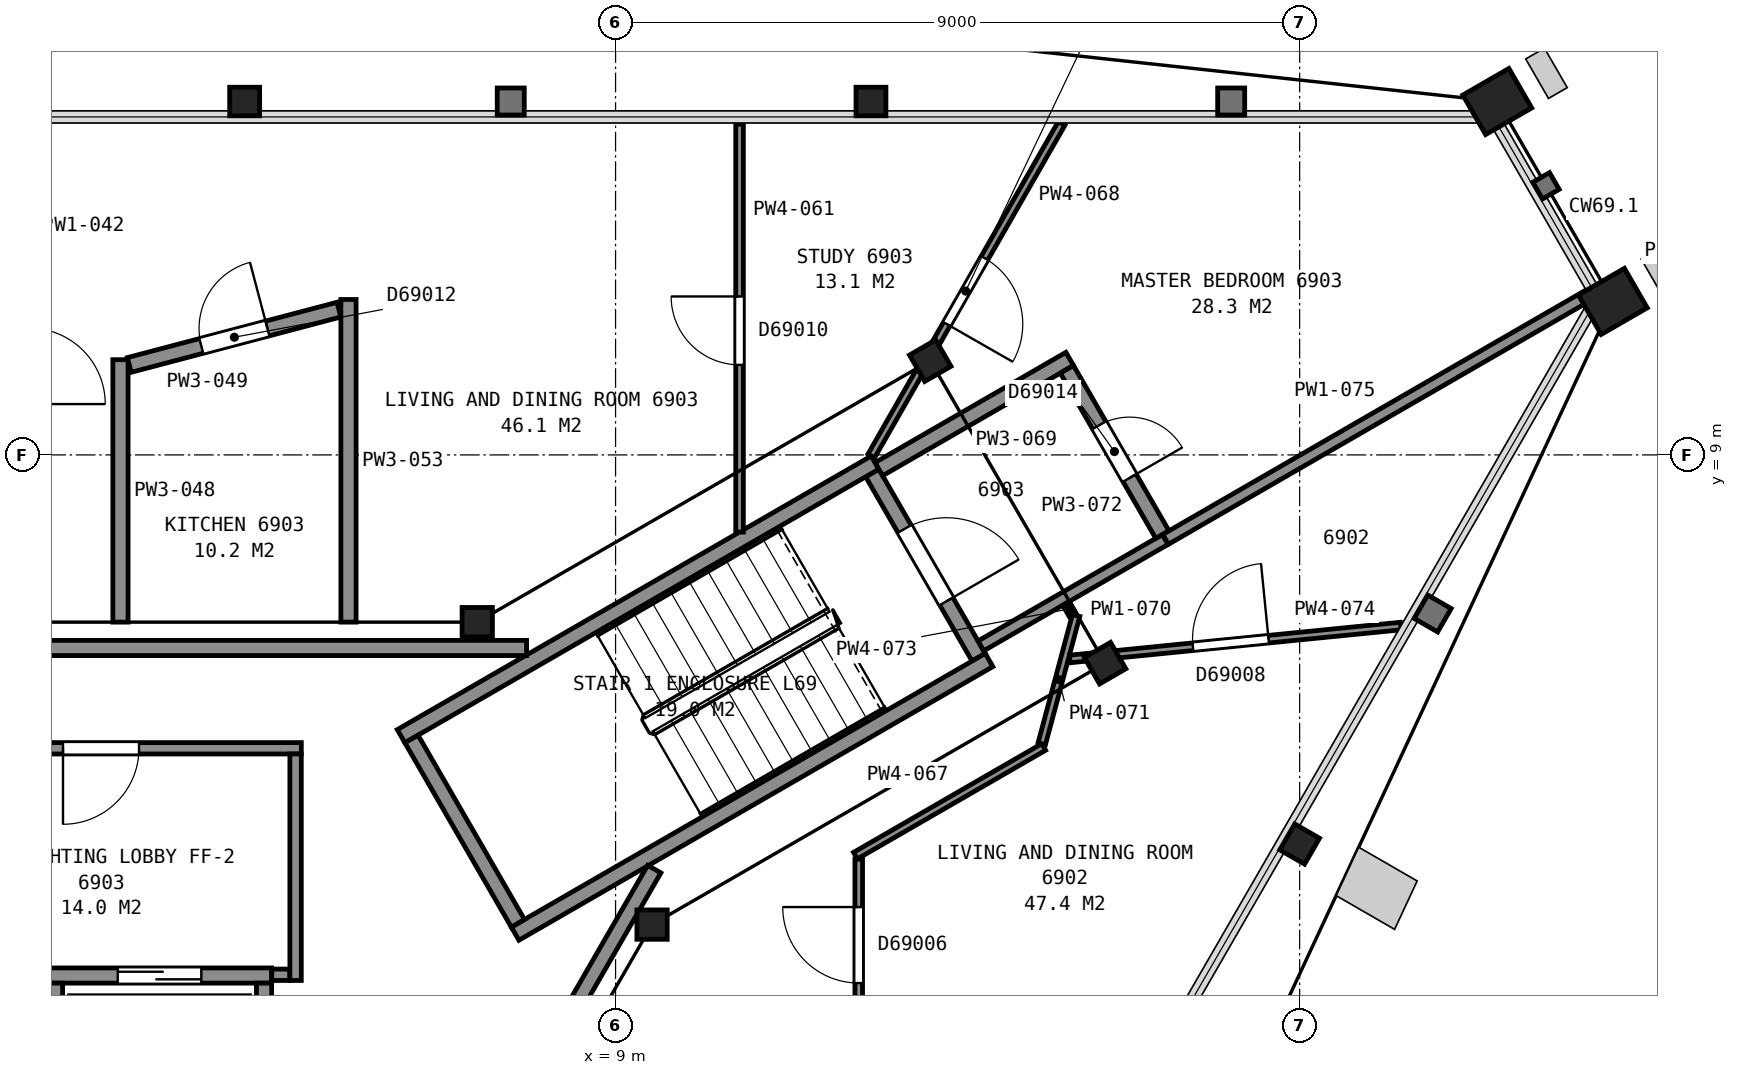
"""IFC4 building model, lengths in metres.
Left out: names, types, materials, properties, quantities, classifications, styles, units other than length and angle.
Written with IfcOpenShell. Run it as: python <this file> out.ifc"""

import sys

from ifc_helpers import new_model, si_unit, direction, frame, frame_2d, origin, origin_2d, place, context, subcontext, project, spatial, rectangle, hollow_rectangle, i_section, extrude, element, fill, save


model = new_model("IFC4")
c1 = context("Model", 3, precision=1e-05, world=origin(), true_north=direction((0.0, 1.0)))
c2 = subcontext(c1, "Body", "Model", "MODEL_VIEW")
j1 = project(units=[si_unit("LENGTHUNIT", "METRE"), si_unit("PLANEANGLEUNIT", "RADIAN")], contexts=[c1])
p1 = place(None, origin())
s1 = spatial("IfcSite", under=j1, at=p1, CompositionType="ELEMENT")
p2 = place(p1, origin())
s2 = spatial("IfcBuilding", under=s1, at=p2, CompositionType="ELEMENT")
p3 = place(p2, frame((0.0, 0.0, 275.1)))
s3 = spatial("IfcBuildingStorey", under=s2, at=p3, CompositionType="ELEMENT", Elevation=275.1)
p4 = place(p3, frame((20.6, 13.65, 0.0), z_axis=(0.0, 0.0, 1.0), x_axis=(0.5, -0.866025403784, 0.0)))
e1 = element("IfcColumn", 1, at=p4, inside=s3, PredefinedType="COLUMN", context=c2, shape_type="SweptSolid", body=[
    extrude(hollow_rectangle(XDim=0.6, YDim=0.7, WallThickness=0.04, at=origin_2d()), origin(), (0.0, 0.0, 1.0), 3.7),
])
for number, where, z_axis, x_axis in (
    (2, (12.36, 13.65, 0.0), (0.0, 0.0, 1.0), (1.0, 0.0, 0.0)),
    (3, (4.12, 13.65, 0.0), (0.0, 0.0, 1.0), (1.0, 0.0, 0.0)),
    (4, (18.0, 3.88, 0.0), (0.0, 0.0, 1.0), (-0.5, -0.866, 0.0)),
):
    element("IfcColumn", number, at=place(p3, frame(where, z_axis=z_axis, x_axis=x_axis)), inside=s3, PredefinedType="COLUMN", context=c2, shape_type="SweptSolid", body=[
        extrude(i_section(OverallWidth=0.394, OverallDepth=0.376, WebThickness=0.017, FlangeThickness=0.028, FilletRadius=0.015, at=origin_2d()), origin(), (0.0, 0.0, 1.0), 3.7),
    ])
p5 = place(p3, frame((22.12, 11.02, 0.0), z_axis=(0.0, 0.0, 1.0), x_axis=(0.5, -0.866025403784, 0.0)))
e5 = element("IfcColumn", 5, at=p5, inside=s3, PredefinedType="COLUMN", context=c2, shape_type="SweptSolid", body=[
    extrude(hollow_rectangle(XDim=0.6, YDim=0.7, WallThickness=0.04, at=origin_2d()), origin(), (0.0, 0.0, 1.0), 3.7),
])
p6 = place(p3, frame((9.48, 2.82, 0.0), z_axis=(0.0, 0.0, 1.0), x_axis=(1.0, 0.0, 0.0)))
e6 = element("IfcColumn", 6, at=p6, inside=s3, PredefinedType="COLUMN", context=c2, shape_type="SweptSolid", body=[
    extrude(i_section(OverallWidth=0.399, OverallDepth=0.386, WebThickness=0.021, FlangeThickness=0.033, FilletRadius=0.015, at=origin_2d()), origin(), (0.0, 0.0, 1.0), 3.7),
])
for number, where, z_axis, x_axis in (
    (7, (15.44, 6.26, 0.0), (0.0, 0.0, 1.0), (0.5, -0.866, 0.0)),
    (8, (13.14, 10.24, 0.0), (0.0, 0.0, 1.0), (0.5, -0.866, 0.0)),
):
    element("IfcColumn", number, at=place(p3, frame(where, z_axis=z_axis, x_axis=x_axis)), inside=s3, PredefinedType="COLUMN", context=c2, shape_type="SweptSolid", body=[
        extrude(i_section(OverallWidth=0.401, OverallDepth=0.399, WebThickness=0.025, FlangeThickness=0.04, FilletRadius=0.015, at=origin_2d()), origin(), (0.0, 0.0, 1.0), 3.7),
    ])
p7 = place(p3, frame((7.18, 6.8, 0.0), z_axis=(0.0, 0.0, 1.0), x_axis=(1.0, 0.0, 0.0)))
e9 = element("IfcColumn", 9, at=p7, inside=s3, PredefinedType="COLUMN", context=c2, shape_type="SweptSolid", body=[
    extrude(i_section(OverallWidth=0.399, OverallDepth=0.386, WebThickness=0.021, FlangeThickness=0.033, FilletRadius=0.015, at=origin_2d()), origin(), (0.0, 0.0, 1.0), 3.7),
])
p8 = place(p3, frame((13.777, 6.338, 0.0), z_axis=(0.0, 0.0, 1.0), x_axis=(-0.500049511043, 0.865996816683, 0.0)))
e10 = element("IfcWall", 10, at=p8, inside=s3, PredefinedType="PARTITIONING", context=c2, shape_type="SweptSolid", body=[
    extrude(rectangle(XDim=2.8, YDim=0.2, at=frame_2d((1.4, 0.0))), origin(), (0.0, 0.0, 1.0), 3.45),
])
p9 = place(p8, frame((0.85, 0.0, 0.0)))
e11 = element("IfcOpeningElement", 11, at=p9, cuts=e10, PredefinedType="OPENING", context=c2, shape_type="SweptSolid", body=[
    extrude(rectangle(XDim=1.1, YDim=2.1, at=frame_2d((0.55, 1.05))), frame((0.0, 0.11, 0.0), z_axis=(0.0, -1.0, 0.0), x_axis=(1.0, 0.0, 0.0)), (0.0, 0.0, 1.0), 0.22),
])
for number, where, z_axis, x_axis in (
    (12, (6.178, 5.299, 0.0), (0.0, 0.0, 1.0), (0.866, 0.5, 0.0)),
    (13, (7.678, 2.701, 0.0), (0.0, 0.0, 1.0), (0.866, 0.5, 0.0)),
):
    element("IfcWall", number, at=place(p3, frame(where, z_axis=z_axis, x_axis=x_axis)), inside=s3, PredefinedType="PARTITIONING", context=c2, shape_type="SweptSolid", body=[
        extrude(rectangle(XDim=7.2, YDim=0.2, at=frame_2d((3.6, 0.0))), origin(), (0.0, 0.0, 1.0), 3.45),
    ])
p10 = place(p3, frame((7.715, 2.838, 0.0), z_axis=(0.0, 0.0, 1.0), x_axis=(-0.500049511043, 0.865996816683, 0.0)))
e14 = element("IfcWall", 14, at=p10, inside=s3, PredefinedType="PARTITIONING", context=c2, shape_type="SweptSolid", body=[
    extrude(rectangle(XDim=2.8, YDim=0.2, at=frame_2d((1.4, 0.0))), origin(), (0.0, 0.0, 1.0), 3.45),
])
p11 = place(p3, frame((1.525, 2.15, 0.0), z_axis=(0.0, 0.0, 1.0), x_axis=(1.0, 0.0, 0.0)))
e15 = element("IfcWall", 15, at=p11, inside=s3, PredefinedType="PARTITIONING", context=c2, shape_type="SweptSolid", body=[
    extrude(rectangle(XDim=2.95, YDim=0.2, at=frame_2d((1.475, 0.0))), origin(), (0.0, 0.0, 1.0), 3.7),
])
p12 = place(p11, frame((0.925, 0.0, 0.0)))
e16 = element("IfcOpeningElement", 16, at=p12, cuts=e15, PredefinedType="OPENING", context=c2, shape_type="SweptSolid", body=[
    extrude(rectangle(XDim=1.1, YDim=2.1, at=frame_2d((0.55, 1.05))), frame((0.0, 0.11, 0.0), z_axis=(0.0, -1.0, 0.0), x_axis=(1.0, 0.0, 0.0)), (0.0, 0.0, 1.0), 0.22),
])
for number, where, z_axis, x_axis in (
    (17, (4.375, 0.1, 0.0), (0.0, 0.0, 1.0), (0.0, 1.0, 0.0)),
    (18, (1.625, 0.1, 0.0), (0.0, 0.0, 1.0), (0.0, 1.0, 0.0)),
):
    element("IfcWall", number, at=place(p3, frame(where, z_axis=z_axis, x_axis=x_axis)), inside=s3, PredefinedType="PARTITIONING", context=c2, shape_type="SweptSolid", body=[
        extrude(rectangle(XDim=1.95, YDim=0.2, at=frame_2d((0.975, 0.0))), origin(), (0.0, 0.0, 1.0), 3.7),
    ])
p13 = place(p3, frame((7.829, 6.46, 0.0), z_axis=(0.0, 0.0, 1.0), x_axis=(-1.0, 0.0, 0.0)))
e19 = element("IfcWall", 19, at=p13, inside=s3, PredefinedType="PARTITIONING", context=c2, shape_type="SweptSolid", body=[
    extrude(rectangle(XDim=15.658, YDim=0.2, at=frame_2d((7.829, 0.0))), origin(), (0.0, 0.0, 1.0), 3.45),
])
p14 = place(p13, frame((12.168, 0.0, 0.0)))
e20 = element("IfcOpeningElement", 20, at=p14, cuts=e19, PredefinedType="OPENING", context=c2, shape_type="SweptSolid", body=[
    extrude(rectangle(XDim=1.2, YDim=2.1, at=frame_2d((0.6, 1.05))), frame((0.0, 0.11, 0.0), z_axis=(0.0, -1.0, 0.0), x_axis=(1.0, 0.0, 0.0)), (0.0, 0.0, 1.0), 0.22),
])
p15 = place(p3, frame((-0.245, 5.14, 0.0), z_axis=(0.0, 0.0, 1.0), x_axis=(1.0, 0.0, 0.0)))
e21 = element("IfcWall", 21, at=p15, inside=s3, PredefinedType="PARTITIONING", context=c2, shape_type="SweptSolid", body=[
    extrude(rectangle(XDim=5.11, YDim=0.15, at=frame_2d((2.555, 0.0))), origin(), (0.0, 0.0, 1.0), 3.45),
])
p16 = place(p15, frame((1.975, 0.0, 0.0)))
e22 = element("IfcOpeningElement", 22, at=p16, cuts=e21, PredefinedType="OPENING", context=c2, shape_type="SweptSolid", body=[
    extrude(rectangle(XDim=1.0, YDim=2.1, at=frame_2d((0.5, 1.05))), frame((0.0, 0.085, 0.0), z_axis=(0.0, -1.0, 0.0), x_axis=(1.0, 0.0, 0.0)), (0.0, 0.0, 1.0), 0.17),
])
p17 = place(p3, frame((3.828, -6.29, 0.0), z_axis=(0.0, 0.0, 1.0), x_axis=(0.499979739078, 0.866037101117, 0.0)))
e23 = element("IfcWall", 23, at=p17, inside=s3, PredefinedType="PARTITIONING", context=c2, shape_type="SweptSolid", body=[
    extrude(rectangle(XDim=11.363, YDim=0.2, at=frame_2d((5.681, 0.0))), origin(), (0.0, 0.0, 1.0), 3.45),
])
p18 = place(p17, frame((0.55, 0.0, 0.0)))
e24 = element("IfcOpeningElement", 24, at=p18, cuts=e23, PredefinedType="OPENING", context=c2, shape_type="SweptSolid", body=[
    extrude(rectangle(XDim=1.2, YDim=2.1, at=frame_2d((0.6, 1.05))), frame((0.0, 0.11, 0.0), z_axis=(0.0, -1.0, 0.0), x_axis=(1.0, 0.0, 0.0)), (0.0, 0.0, 1.0), 0.22),
])
p19 = place(p3, frame((4.477, 2.16, 0.0), z_axis=(0.0, 0.0, 1.0), x_axis=(1.0, 0.0, 0.0)))
e25 = element("IfcWall", 25, at=p19, inside=s3, PredefinedType="PARTITIONING", context=c2, shape_type="SweptSolid", body=[
    extrude(rectangle(XDim=0.238, YDim=0.15, at=frame_2d((0.119, 0.0))), origin(), (0.0, 0.0, 1.0), 3.45),
])
p20 = place(p3, frame((4.79, 2.085, 0.0), z_axis=(0.0, 0.0, 1.0), x_axis=(0.0, 1.0, 0.0)))
e26 = element("IfcWall", 26, at=p20, inside=s3, PredefinedType="PARTITIONING", context=c2, shape_type="SweptSolid", body=[
    extrude(rectangle(XDim=2.98, YDim=0.15, at=frame_2d((1.49, 0.0))), origin(), (0.0, 0.0, 1.0), 3.45),
])
p21 = place(p3, frame((2.486, 6.8, 0.0), z_axis=(0.0, 0.0, 1.0), x_axis=(0.0, 1.0, 0.0)))
e27 = element("IfcWall", 27, at=p21, inside=s3, PredefinedType="PARTITIONING", context=c2, shape_type="SweptSolid", body=[
    extrude(rectangle(XDim=3.453, YDim=0.2, at=frame_2d((1.727, 0.0))), origin(), (0.0, 0.0, 1.0), 2.723),
])
p22 = place(p3, frame((5.36, 10.912, 0.0), z_axis=(0.0, 0.0, 1.0), x_axis=(-0.966866921155, -0.255280936963, 0.0)))
e28 = element("IfcWall", 28, at=p22, inside=s3, PredefinedType="PARTITIONING", context=c2, shape_type="SweptSolid", body=[
    extrude(rectangle(XDim=2.853, YDim=0.2, at=frame_2d((1.426, 0.0))), origin(), (0.0, 0.0, 1.0), 2.723),
])
p23 = place(p22, frame((0.973, 0.0, 0.0)))
e29 = element("IfcOpeningElement", 29, at=p23, cuts=e28, PredefinedType="OPENING", context=c2, shape_type="SweptSolid", body=[
    extrude(rectangle(XDim=0.9, YDim=2.1, at=frame_2d((0.45, 1.05))), frame((0.0, 0.11, 0.0), z_axis=(0.0, -1.0, 0.0), x_axis=(1.0, 0.0, 0.0)), (0.0, 0.0, 1.0), 0.22),
])
p24 = place(p3, frame((5.486, 6.8, 0.0), z_axis=(0.0, 0.0, 1.0), x_axis=(0.0, 1.0, 0.0)))
e30 = element("IfcWall", 30, at=p24, inside=s3, PredefinedType="PARTITIONING", context=c2, shape_type="SweptSolid", body=[
    extrude(rectangle(XDim=4.245, YDim=0.2, at=frame_2d((2.123, 0.0))), origin(), (0.0, 0.0, 1.0), 2.723),
])
p25 = place(p3, frame((10.631, 13.351, 0.0), z_axis=(0.0, 0.0, 1.0), x_axis=(0.0, -1.0, 0.0)))
e31 = element("IfcWall", 31, at=p25, inside=s3, PredefinedType="PARTITIONING", context=c2, shape_type="SweptSolid", body=[
    extrude(rectangle(XDim=5.366, YDim=0.1, at=frame_2d((2.683, 0.0))), origin(), (0.0, 0.0, 1.0), 2.723),
])
p26 = place(p25, frame((2.266, 0.0, 0.0)))
e32 = element("IfcOpeningElement", 32, at=p26, cuts=e31, PredefinedType="OPENING", context=c2, shape_type="SweptSolid", body=[
    extrude(rectangle(XDim=0.9, YDim=2.1, at=frame_2d((0.45, 1.05))), frame((0.0, 0.06, 0.0), z_axis=(0.0, -1.0, 0.0), x_axis=(1.0, 0.0, 0.0)), (0.0, 0.0, 1.0), 0.12),
])
p27 = place(p3, frame((12.199, 3.682, 0.0), z_axis=(0.0, 0.0, 1.0), x_axis=(0.0, -1.0, 0.0)))
e33 = element("IfcWall", 33, at=p27, inside=s3, PredefinedType="PARTITIONING", context=c2, shape_type="SweptSolid", body=[
    extrude(rectangle(XDim=2.331, YDim=0.1, at=frame_2d((1.166, 0.0))), origin(), (0.0, 0.0, 1.0), 2.723),
])
p28 = place(p27, frame((0.631, 0.0, 0.0)))
e34 = element("IfcOpeningElement", 34, at=p28, cuts=e33, PredefinedType="OPENING", context=c2, shape_type="SweptSolid", body=[
    extrude(rectangle(XDim=1.0, YDim=2.1, at=frame_2d((0.5, 1.05))), frame((0.0, 0.06, 0.0), z_axis=(0.0, -1.0, 0.0), x_axis=(1.0, 0.0, 0.0)), (0.0, 0.0, 1.0), 0.12),
])
p29 = place(p3, frame((12.156, 3.727, 0.0), z_axis=(0.0, 0.0, 1.0), x_axis=(0.866012137121, 0.500022977831, 0.0)))
e35 = element("IfcWall", 35, at=p29, inside=s3, PredefinedType="PARTITIONING", context=c2, shape_type="SweptSolid", body=[
    extrude(rectangle(XDim=2.86, YDim=0.1, at=frame_2d((1.43, 0.0))), origin(), (0.0, 0.0, 1.0), 2.723),
])
p30 = place(p3, frame((14.868, 13.362, 0.0), z_axis=(0.0, 0.0, 1.0), x_axis=(-0.496681239155, -0.867933031214, 0.0)))
e36 = element("IfcWall", 36, at=p30, inside=s3, PredefinedType="PARTITIONING", context=c2, shape_type="SweptSolid", body=[
    extrude(rectangle(XDim=5.041, YDim=0.1, at=frame_2d((2.521, 0.0))), origin(), (0.0, 0.0, 1.0), 2.723),
])
p31 = place(p30, frame((2.041, 0.0, 0.0)))
e37 = element("IfcOpeningElement", 37, at=p31, cuts=e36, PredefinedType="OPENING", context=c2, shape_type="SweptSolid", body=[
    extrude(rectangle(XDim=1.0, YDim=2.1, at=frame_2d((0.5, 1.05))), frame((0.0, 0.06, 0.0), z_axis=(0.0, -1.0, 0.0), x_axis=(1.0, 0.0, 0.0)), (0.0, 0.0, 1.0), 0.12),
])
p32 = place(p3, frame((12.464, 8.813, 0.0), z_axis=(0.0, 0.0, 1.0), x_axis=(0.865948555758, 0.50013308107, 0.0)))
e38 = element("IfcWall", 38, at=p32, inside=s3, PredefinedType="PARTITIONING", context=c2, shape_type="SweptSolid", body=[
    extrude(rectangle(XDim=2.899, YDim=0.2, at=frame_2d((1.45, 0.0))), origin(), (0.0, 0.0, 1.0), 2.723),
])
p33 = place(p3, frame((13.806, 6.487, 0.0), z_axis=(0.0, 0.0, 1.0), x_axis=(0.866056369097, 0.49994636267, 0.0)))
e39 = element("IfcWall", 39, at=p33, inside=s3, PredefinedType="PARTITIONING", context=c2, shape_type="SweptSolid", body=[
    extrude(rectangle(XDim=2.8, YDim=0.15, at=frame_2d((1.4, 0.0))), origin(), (0.0, 0.0, 1.0), 2.723),
])
p34 = place(p3, frame((14.607, 5.2, 0.0), z_axis=(0.0, 0.0, 1.0), x_axis=(0.258549793661, 0.965997931777, 0.0)))
e40 = element("IfcWall", 40, at=p34, inside=s3, PredefinedType="PARTITIONING", context=c2, shape_type="SweptSolid", body=[
    extrude(rectangle(XDim=1.747, YDim=0.1, at=frame_2d((0.874, 0.0))), origin(), (0.0, 0.0, 1.0), 2.723),
])
p35 = place(p3, frame((16.194, 7.952, 0.0), z_axis=(0.0, 0.0, 1.0), x_axis=(-0.500039460523, 0.866002620042, 0.0)))
e41 = element("IfcWall", 41, at=p35, inside=s3, PredefinedType="PARTITIONING", context=c2, shape_type="SweptSolid", body=[
    extrude(rectangle(XDim=2.511, YDim=0.2, at=frame_2d((1.255, 0.0))), origin(), (0.0, 0.0, 1.0), 2.723),
])
p36 = place(p35, frame((0.861, 0.0, 0.0)))
e42 = element("IfcOpeningElement", 42, at=p36, cuts=e41, PredefinedType="OPENING", context=c2, shape_type="SweptSolid", body=[
    extrude(rectangle(XDim=0.8, YDim=2.1, at=frame_2d((0.4, 1.05))), frame((0.0, 0.11, 0.0), z_axis=(0.0, -1.0, 0.0), x_axis=(1.0, 0.0, 0.0)), (0.0, 0.0, 1.0), 0.22),
])
p37 = place(p3, frame((14.927, 7.047, 0.0), z_axis=(0.0, 0.0, 1.0), x_axis=(0.497687197367, -0.867356589631, 0.0)))
e43 = element("IfcWall", 43, at=p37, inside=s3, PredefinedType="PARTITIONING", context=c2, shape_type="SweptSolid", body=[
    extrude(rectangle(XDim=0.17, YDim=0.1, at=frame_2d((0.085, 0.0))), origin(), (0.0, 0.0, 1.0), 2.723),
])
p38 = place(p3, frame((14.976, 6.315, 0.0), z_axis=(0.0, 0.0, 1.0), x_axis=(0.995082940066, 0.09904515329, 0.0)))
e44 = element("IfcWall", 44, at=p38, inside=s3, PredefinedType="PARTITIONING", context=c2, shape_type="SweptSolid", body=[
    extrude(rectangle(XDim=4.375, YDim=0.1, at=frame_2d((2.188, 0.0))), origin(), (0.0, 0.0, 1.0), 2.723),
])
p39 = place(p38, frame((1.628, 0.0, 0.0)))
e45 = element("IfcOpeningElement", 45, at=p39, cuts=e44, PredefinedType="OPENING", context=c2, shape_type="SweptSolid", body=[
    extrude(rectangle(XDim=1.0, YDim=2.1, at=frame_2d((0.5, 1.05))), frame((0.0, 0.06, 0.0), z_axis=(0.0, -1.0, 0.0), x_axis=(1.0, 0.0, 0.0)), (0.0, 0.0, 1.0), 0.12),
])
p40 = place(p3, frame((16.236, 7.889, 0.0), z_axis=(0.0, 0.0, 1.0), x_axis=(0.865995456094, 0.500051867335, 0.0)))
e46 = element("IfcWall", 46, at=p40, inside=s3, PredefinedType="PARTITIONING", context=c2, shape_type="SweptSolid", body=[
    extrude(rectangle(XDim=6.415, YDim=0.15, at=frame_2d((3.208, 0.0))), origin(), (0.0, 0.0, 1.0), 2.723),
])
p41 = place(p9, origin())
e47 = element("IfcDoor", 47, at=p41, inside=s3, OperationType="SINGLE_SWING_LEFT", PredefinedType="DOOR", context=c2, shape_type="SweptSolid", body=[
    extrude(rectangle(XDim=1.1, YDim=2.1, at=frame_2d((0.55, 1.05))), frame((0.0, 0.025, 0.0), z_axis=(0.0, -1.0, 0.0), x_axis=(1.0, 0.0, 0.0)), (0.0, 0.0, 1.0), 0.05),
])
fill(e11, e47)
p42 = place(p12, origin())
e48 = element("IfcDoor", 48, at=p42, inside=s3, OperationType="SLIDING_TO_RIGHT", PredefinedType="DOOR", context=c2, shape_type="SweptSolid", body=[
    extrude(rectangle(XDim=1.1, YDim=2.1, at=frame_2d((0.55, 1.05))), frame((0.0, 0.025, 0.0), z_axis=(0.0, -1.0, 0.0), x_axis=(1.0, 0.0, 0.0)), (0.0, 0.0, 1.0), 0.05),
])
fill(e16, e48)
p43 = place(p16, origin())
e49 = element("IfcDoor", 49, at=p43, inside=s3, OperationType="SINGLE_SWING_LEFT", PredefinedType="DOOR", context=c2, shape_type="SweptSolid", body=[
    extrude(rectangle(XDim=1.0, YDim=2.1, at=frame_2d((0.5, 1.05))), frame((0.0, 0.025, 0.0), z_axis=(0.0, -1.0, 0.0), x_axis=(1.0, 0.0, 0.0)), (0.0, 0.0, 1.0), 0.05),
])
fill(e22, e49)
p44 = place(p23, origin())
e50 = element("IfcDoor", 50, at=p44, inside=s3, OperationType="SINGLE_SWING_LEFT", PredefinedType="DOOR", context=c2, shape_type="SweptSolid", body=[
    extrude(rectangle(XDim=0.9, YDim=2.1, at=frame_2d((0.45, 1.05))), frame((0.0, 0.025, 0.0), z_axis=(0.0, -1.0, 0.0), x_axis=(1.0, 0.0, 0.0)), (0.0, 0.0, 1.0), 0.05),
])
fill(e29, e50)
p45 = place(p26, origin())
e51 = element("IfcDoor", 51, at=p45, inside=s3, OperationType="SINGLE_SWING_LEFT", PredefinedType="DOOR", context=c2, shape_type="SweptSolid", body=[
    extrude(rectangle(XDim=0.9, YDim=2.1, at=frame_2d((0.45, 1.05))), frame((0.0, 0.025, 0.0), z_axis=(0.0, -1.0, 0.0), x_axis=(1.0, 0.0, 0.0)), (0.0, 0.0, 1.0), 0.05),
])
fill(e32, e51)
p46 = place(p28, origin())
e52 = element("IfcDoor", 52, at=p46, inside=s3, OperationType="SINGLE_SWING_LEFT", PredefinedType="DOOR", context=c2, shape_type="SweptSolid", body=[
    extrude(rectangle(XDim=1.0, YDim=2.1, at=frame_2d((0.5, 1.05))), frame((0.0, 0.025, 0.0), z_axis=(0.0, -1.0, 0.0), x_axis=(1.0, 0.0, 0.0)), (0.0, 0.0, 1.0), 0.05),
])
fill(e34, e52)
p47 = place(p31, origin())
e53 = element("IfcDoor", 53, at=p47, inside=s3, OperationType="SINGLE_SWING_RIGHT", PredefinedType="DOOR", context=c2, shape_type="SweptSolid", body=[
    extrude(rectangle(XDim=1.0, YDim=2.1, at=frame_2d((0.5, 1.05))), frame((0.0, 0.025, 0.0), z_axis=(0.0, -1.0, 0.0), x_axis=(1.0, 0.0, 0.0)), (0.0, 0.0, 1.0), 0.05),
])
fill(e37, e53)
p48 = place(p36, origin())
e54 = element("IfcDoor", 54, at=p48, inside=s3, OperationType="SINGLE_SWING_LEFT", PredefinedType="DOOR", context=c2, shape_type="SweptSolid", body=[
    extrude(rectangle(XDim=0.8, YDim=2.1, at=frame_2d((0.4, 1.05))), frame((0.0, 0.025, 0.0), z_axis=(0.0, -1.0, 0.0), x_axis=(1.0, 0.0, 0.0)), (0.0, 0.0, 1.0), 0.05),
])
fill(e42, e54)
p49 = place(p39, origin())
e55 = element("IfcDoor", 55, at=p49, inside=s3, OperationType="SINGLE_SWING_RIGHT", PredefinedType="DOOR", context=c2, shape_type="SweptSolid", body=[
    extrude(rectangle(XDim=1.0, YDim=2.1, at=frame_2d((0.5, 1.05))), frame((0.0, 0.025, 0.0), z_axis=(0.0, -1.0, 0.0), x_axis=(1.0, 0.0, 0.0)), (0.0, 0.0, 1.0), 0.05),
])
fill(e45, e55)
save(model, sys.argv[1])
